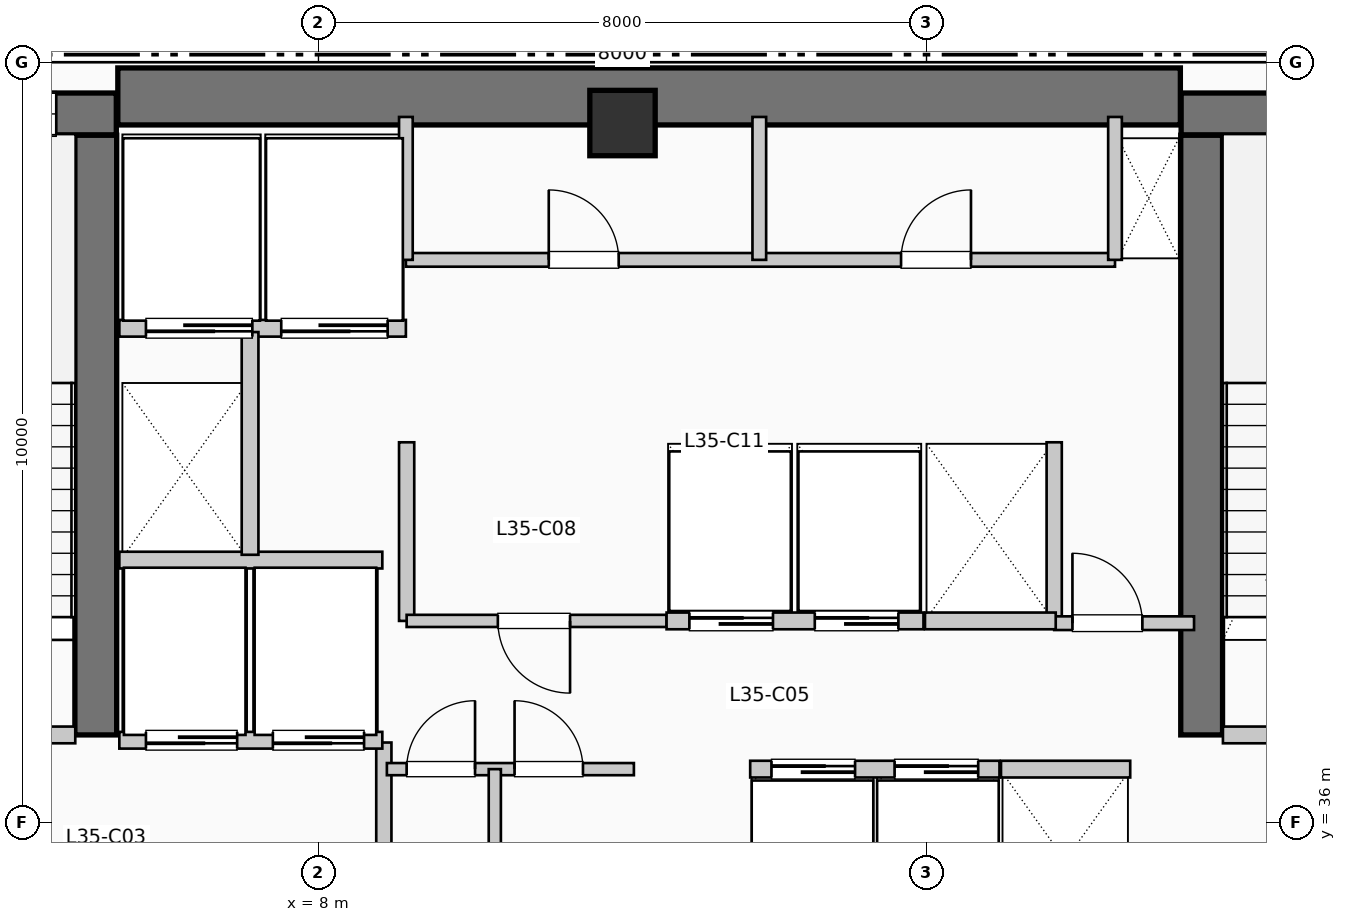
"""IFC4 building model, lengths in metres.
Left out: names, types, materials, properties, quantities, classifications, styles, units other than length and angle.
Written with IfcOpenShell. Run it as: python <this file> out.ifc"""

import sys

from ifc_helpers import new_model, si_unit, direction, frame, frame_2d, origin, origin_2d, place, context, subcontext, project, spatial, rectangle, extrude, element, fill, save


model = new_model("IFC4")
c1 = context("Model", 3, precision=1e-05, world=origin(), true_north=direction((0.0, 1.0)))
c2 = subcontext(c1, "Body", "Model", "MODEL_VIEW")
j1 = project(units=[si_unit("LENGTHUNIT", "METRE"), si_unit("PLANEANGLEUNIT", "RADIAN")], contexts=[c1])
p1 = place(None, origin())
s1 = spatial("IfcSite", under=j1, at=p1, CompositionType="ELEMENT")
p2 = place(p1, origin())
s2 = spatial("IfcBuilding", under=s1, at=p2, CompositionType="ELEMENT")
p3 = place(p2, frame((0.0, 0.0, 146.85)))
s3 = spatial("IfcBuildingStorey", under=s2, at=p3, CompositionType="ELEMENT", Elevation=146.85)
p4 = place(p3, frame((5.36, 45.55, 0.0), z_axis=(0.0, 0.0, 1.0), x_axis=(1.0, 0.0, 0.0)))
e1 = element("IfcWall", 1, at=p4, inside=s3, PredefinedType="SHEAR", context=c2, shape_type="SweptSolid", body=[
    extrude(rectangle(XDim=13.98, YDim=0.75, at=frame_2d((6.99, 0.0))), origin(), (0.0, 0.0, 1.0), 3.96),
])
p5 = place(p3, frame((5.07, 37.15, 0.0), z_axis=(0.0, 0.0, 1.0), x_axis=(0.0, 1.0, 0.0)))
e2 = element("IfcWall", 2, at=p5, inside=s3, PredefinedType="SHEAR", context=c2, shape_type="SweptSolid", body=[
    extrude(rectangle(XDim=7.89, YDim=0.55, at=frame_2d((3.945, 0.0))), origin(), (0.0, 0.0, 1.0), 3.96),
])
p6 = place(p3, frame((1.1, 45.32, 0.0), z_axis=(0.0, 0.0, 1.0), x_axis=(1.0, 0.0, 0.0)))
e3 = element("IfcWall", 3, at=p6, inside=s3, PredefinedType="SHEAR", context=c2, shape_type="SweptSolid", body=[
    extrude(rectangle(XDim=4.24, YDim=0.55, at=frame_2d((2.12, 0.0))), origin(), (0.0, 0.0, 1.0), 3.96),
])
p7 = place(p6, frame((2.05, 0.0, 1.05)))
e4 = element("IfcOpeningElement", 4, at=p7, cuts=e3, PredefinedType="OPENING", context=c2, shape_type="SweptSolid", body=[
    extrude(rectangle(XDim=1.4, YDim=1.8, at=frame_2d((0.7, 0.9))), frame((0.0, 0.285, 0.0), z_axis=(0.0, -1.0, 0.0), x_axis=(1.0, 0.0, 0.0)), (0.0, 0.0, 1.0), 0.57),
])
p8 = place(p3, frame((19.62, 37.15, 0.0), z_axis=(0.0, 0.0, 1.0), x_axis=(0.0, 1.0, 0.0)))
e5 = element("IfcWall", 5, at=p8, inside=s3, PredefinedType="SHEAR", context=c2, shape_type="SweptSolid", body=[
    extrude(rectangle(XDim=7.89, YDim=0.55, at=frame_2d((3.945, 0.0))), origin(), (0.0, 0.0, 1.0), 3.96),
])
p9 = place(p3, frame((19.35, 45.32, 0.0), z_axis=(0.0, 0.0, 1.0), x_axis=(1.0, 0.0, 0.0)))
e6 = element("IfcWall", 6, at=p9, inside=s3, PredefinedType="SHEAR", context=c2, shape_type="SweptSolid", body=[
    extrude(rectangle(XDim=3.69, YDim=0.55, at=frame_2d((1.845, 0.0))), origin(), (0.0, 0.0, 1.0), 3.96),
])
p10 = place(p9, frame((1.15, 0.0, 1.05)))
e7 = element("IfcOpeningElement", 7, at=p10, cuts=e6, PredefinedType="OPENING", context=c2, shape_type="SweptSolid", body=[
    extrude(rectangle(XDim=1.4, YDim=1.8, at=frame_2d((0.7, 0.9))), frame((0.0, 0.285, 0.0), z_axis=(0.0, -1.0, 0.0), x_axis=(1.0, 0.0, 0.0)), (0.0, 0.0, 1.0), 0.57),
])
p11 = place(p3, frame((12.0, 45.2, 0.0), z_axis=(0.0, 0.0, 1.0), x_axis=(1.0, 0.0, 0.0)))
e8 = element("IfcColumn", 8, at=p11, inside=s3, PredefinedType="COLUMN", context=c2, shape_type="SweptSolid", body=[
    extrude(rectangle(XDim=0.86, YDim=0.86, at=origin_2d()), origin(), (0.0, 0.0, 1.0), 3.96),
])
p12 = place(p3, frame((1.65, 37.15, 0.0), z_axis=(0.0, 0.0, 1.0), x_axis=(1.0, 0.0, 0.0)))
e9 = element("IfcWall", 9, at=p12, inside=s3, PredefinedType="PARTITIONING", context=c2, shape_type="SweptSolid", body=[
    extrude(rectangle(XDim=3.15, YDim=0.22, at=frame_2d((1.575, 0.0))), origin(), (0.0, 0.0, 1.0), 3.71),
])
p13 = place(p12, frame((2.05, 0.0, 0.0), z_axis=(0.0, 0.0, 1.0), x_axis=(-1.0, 0.0, 0.0)))
e10 = element("IfcOpeningElement", 10, at=p13, cuts=e9, PredefinedType="OPENING", context=c2, shape_type="SweptSolid", body=[
    extrude(rectangle(XDim=1.05, YDim=2.15, at=frame_2d((0.525, 1.075))), frame((0.0, 0.12, 0.0), z_axis=(0.0, -1.0, 0.0), x_axis=(1.0, 0.0, 0.0)), (0.0, 0.0, 1.0), 0.24),
])
p14 = place(p3, frame((8.86, 34.55, 0.0), z_axis=(0.0, 0.0, 1.0), x_axis=(0.0, 1.0, 0.0)))
e11 = element("IfcWall", 11, at=p14, inside=s3, PredefinedType="PARTITIONING", context=c2, shape_type="SweptSolid", body=[
    extrude(rectangle(XDim=2.5, YDim=0.2, at=frame_2d((1.25, 0.0))), origin(), (0.0, 0.0, 1.0), 3.71),
])
p15 = place(p3, frame((19.9, 37.15, 0.0), z_axis=(0.0, 0.0, 1.0), x_axis=(1.0, 0.0, 0.0)))
e12 = element("IfcWall", 12, at=p15, inside=s3, PredefinedType="PARTITIONING", context=c2, shape_type="SweptSolid", body=[
    extrude(rectangle(XDim=3.15, YDim=0.22, at=frame_2d((1.575, 0.0))), origin(), (0.0, 0.0, 1.0), 3.71),
])
p16 = place(p15, frame((2.05, 0.0, 0.0), z_axis=(0.0, 0.0, 1.0), x_axis=(-1.0, 0.0, 0.0)))
e13 = element("IfcOpeningElement", 13, at=p16, cuts=e12, PredefinedType="OPENING", context=c2, shape_type="SweptSolid", body=[
    extrude(rectangle(XDim=1.05, YDim=2.15, at=frame_2d((0.525, 1.075))), frame((0.0, 0.12, 0.0), z_axis=(0.0, -1.0, 0.0), x_axis=(1.0, 0.0, 0.0)), (0.0, 0.0, 1.0), 0.24),
])
p17 = place(p3, frame((5.38, 37.08, 0.0), z_axis=(0.0, 0.0, 1.0), x_axis=(1.0, 0.0, 0.0)))
e14 = element("IfcWall", 14, at=p17, inside=s3, PredefinedType="PARTITIONING", context=c2, shape_type="SweptSolid", body=[
    extrude(rectangle(XDim=3.46, YDim=0.22, at=frame_2d((1.73, 0.0))), origin(), (0.0, 0.0, 1.0), 3.71),
])
p18 = place(p17, frame((1.55, 0.0, 0.0), z_axis=(0.0, 0.0, 1.0), x_axis=(-1.0, 0.0, 0.0)))
e15 = element("IfcOpeningElement", 15, at=p18, cuts=e14, PredefinedType="OPENING", context=c2, shape_type="SweptSolid", body=[
    extrude(rectangle(XDim=1.2, YDim=2.2, at=frame_2d((0.6, 1.1))), frame((0.0, 0.12, 0.0), z_axis=(0.0, -1.0, 0.0), x_axis=(1.0, 0.0, 0.0)), (0.0, 0.0, 1.0), 0.24),
])
p19 = place(p17, frame((3.22, 0.0, 0.0), z_axis=(0.0, 0.0, 1.0), x_axis=(-1.0, 0.0, 0.0)))
e16 = element("IfcOpeningElement", 16, at=p19, cuts=e14, PredefinedType="OPENING", context=c2, shape_type="SweptSolid", body=[
    extrude(rectangle(XDim=1.2, YDim=2.2, at=frame_2d((0.6, 1.1))), frame((0.0, 0.12, 0.0), z_axis=(0.0, -1.0, 0.0), x_axis=(1.0, 0.0, 0.0)), (0.0, 0.0, 1.0), 0.24),
])
p20 = place(p3, frame((5.38, 39.45, 0.0), z_axis=(0.0, 0.0, 1.0), x_axis=(1.0, 0.0, 0.0)))
e17 = element("IfcWall", 17, at=p20, inside=s3, PredefinedType="PARTITIONING", context=c2, shape_type="SweptSolid", body=[
    extrude(rectangle(XDim=3.46, YDim=0.22, at=frame_2d((1.73, 0.0))), origin(), (0.0, 0.0, 1.0), 3.71),
])
p21 = place(p3, frame((5.38, 42.5, 0.0), z_axis=(0.0, 0.0, 1.0), x_axis=(1.0, 0.0, 0.0)))
e18 = element("IfcWall", 18, at=p21, inside=s3, PredefinedType="PARTITIONING", context=c2, shape_type="SweptSolid", body=[
    extrude(rectangle(XDim=3.77, YDim=0.22, at=frame_2d((1.885, 0.0))), origin(), (0.0, 0.0, 1.0), 3.71),
])
p22 = place(p21, frame((1.75, 0.0, 0.0), z_axis=(0.0, 0.0, 1.0), x_axis=(-1.0, 0.0, 0.0)))
e19 = element("IfcOpeningElement", 19, at=p22, cuts=e18, PredefinedType="OPENING", context=c2, shape_type="SweptSolid", body=[
    extrude(rectangle(XDim=1.4, YDim=2.2, at=frame_2d((0.7, 1.1))), frame((0.0, 0.12, 0.0), z_axis=(0.0, -1.0, 0.0), x_axis=(1.0, 0.0, 0.0)), (0.0, 0.0, 1.0), 0.24),
])
p23 = place(p21, frame((3.53, 0.0, 0.0), z_axis=(0.0, 0.0, 1.0), x_axis=(-1.0, 0.0, 0.0)))
e20 = element("IfcOpeningElement", 20, at=p23, cuts=e18, PredefinedType="OPENING", context=c2, shape_type="SweptSolid", body=[
    extrude(rectangle(XDim=1.4, YDim=2.2, at=frame_2d((0.7, 1.1))), frame((0.0, 0.12, 0.0), z_axis=(0.0, -1.0, 0.0), x_axis=(1.0, 0.0, 0.0)), (0.0, 0.0, 1.0), 0.24),
])
p24 = place(p3, frame((7.1, 39.52, 0.0), z_axis=(0.0, 0.0, 1.0), x_axis=(0.0, 1.0, 0.0)))
e21 = element("IfcWall", 21, at=p24, inside=s3, PredefinedType="PARTITIONING", context=c2, shape_type="SweptSolid", body=[
    extrude(rectangle(XDim=2.93, YDim=0.22, at=frame_2d((1.465, 0.0))), origin(), (0.0, 0.0, 1.0), 3.71),
])
for number, where, z_axis, x_axis in (
    (22, (9.16, 38.65, 0.0), (0.0, 0.0, 1.0), (0.0, 1.0, 0.0)),
    (23, (17.68, 38.65, 0.0), (0.0, 0.0, 1.0), (0.0, 1.0, 0.0)),
):
    element("IfcWall", number, at=place(p3, frame(where, z_axis=z_axis, x_axis=x_axis)), inside=s3, PredefinedType="PARTITIONING", context=c2, shape_type="SweptSolid", body=[
        extrude(rectangle(XDim=2.35, YDim=0.2, at=frame_2d((1.175, 0.0))), origin(), (0.0, 0.0, 1.0), 3.71),
    ])
p25 = place(p3, frame((17.68, 38.62, 0.0), z_axis=(0.0, 0.0, 1.0), x_axis=(1.0, 0.0, 0.0)))
e24 = element("IfcWall", 24, at=p25, inside=s3, PredefinedType="PARTITIONING", context=c2, shape_type="SweptSolid", body=[
    extrude(rectangle(XDim=1.84, YDim=0.18, at=frame_2d((0.92, 0.0))), origin(), (0.0, 0.0, 1.0), 3.71),
])
p26 = place(p25, frame((0.24, 0.0, 0.0)))
e25 = element("IfcOpeningElement", 25, at=p26, cuts=e24, PredefinedType="OPENING", context=c2, shape_type="SweptSolid", body=[
    extrude(rectangle(XDim=0.92, YDim=2.1, at=frame_2d((0.46, 1.05))), frame((0.0, 0.1, 0.0), z_axis=(0.0, -1.0, 0.0), x_axis=(1.0, 0.0, 0.0)), (0.0, 0.0, 1.0), 0.2),
])
p27 = place(p3, frame((8.9, 36.7, 0.0), z_axis=(0.0, 0.0, 1.0), x_axis=(1.0, 0.0, 0.0)))
e26 = element("IfcWall", 26, at=p27, inside=s3, PredefinedType="PARTITIONING", context=c2, shape_type="SweptSolid", body=[
    extrude(rectangle(XDim=3.25, YDim=0.16, at=frame_2d((1.625, 0.0))), origin(), (0.0, 0.0, 1.0), 3.71),
])
p28 = place(p27, frame((0.26, 0.0, 0.0)))
e27 = element("IfcOpeningElement", 27, at=p28, cuts=e26, PredefinedType="OPENING", context=c2, shape_type="SweptSolid", body=[
    extrude(rectangle(XDim=0.9, YDim=2.15, at=frame_2d((0.45, 1.075))), frame((0.0, 0.09, 0.0), z_axis=(0.0, -1.0, 0.0), x_axis=(1.0, 0.0, 0.0)), (0.0, 0.0, 1.0), 0.18),
])
p29 = place(p27, frame((1.68, 0.0, 0.0)))
e28 = element("IfcOpeningElement", 28, at=p29, cuts=e26, PredefinedType="OPENING", context=c2, shape_type="SweptSolid", body=[
    extrude(rectangle(XDim=0.9, YDim=2.15, at=frame_2d((0.45, 1.075))), frame((0.0, 0.09, 0.0), z_axis=(0.0, -1.0, 0.0), x_axis=(1.0, 0.0, 0.0)), (0.0, 0.0, 1.0), 0.18),
])
p30 = place(p3, frame((10.32, 34.55, 0.0), z_axis=(0.0, 0.0, 1.0), x_axis=(0.0, 1.0, 0.0)))
e29 = element("IfcWall", 29, at=p30, inside=s3, PredefinedType="PARTITIONING", context=c2, shape_type="SweptSolid", body=[
    extrude(rectangle(XDim=2.15, YDim=0.16, at=frame_2d((1.075, 0.0))), origin(), (0.0, 0.0, 1.0), 3.71),
])
p31 = place(p3, frame((9.16, 38.65, 0.0), z_axis=(0.0, 0.0, 1.0), x_axis=(1.0, 0.0, 0.0)))
e30 = element("IfcWall", 30, at=p31, inside=s3, PredefinedType="PARTITIONING", context=c2, shape_type="SweptSolid", body=[
    extrude(rectangle(XDim=3.42, YDim=0.16, at=frame_2d((1.71, 0.0))), origin(), (0.0, 0.0, 1.0), 3.71),
])
p32 = place(p31, frame((2.15, 0.0, 0.0), z_axis=(0.0, 0.0, 1.0), x_axis=(-1.0, 0.0, 0.0)))
e31 = element("IfcOpeningElement", 31, at=p32, cuts=e30, PredefinedType="OPENING", context=c2, shape_type="SweptSolid", body=[
    extrude(rectangle(XDim=0.95, YDim=2.15, at=frame_2d((0.475, 1.075))), frame((0.0, 0.09, 0.0), z_axis=(0.0, -1.0, 0.0), x_axis=(1.0, 0.0, 0.0)), (0.0, 0.0, 1.0), 0.18),
])
p33 = place(p3, frame((13.68, 36.7, 0.0), z_axis=(0.0, 0.0, 1.0), x_axis=(1.0, 0.0, 0.0)))
e32 = element("IfcWall", 32, at=p33, inside=s3, PredefinedType="PARTITIONING", context=c2, shape_type="SweptSolid", body=[
    extrude(rectangle(XDim=3.28, YDim=0.22, at=frame_2d((1.64, 0.0))), origin(), (0.0, 0.0, 1.0), 3.71),
])
p34 = place(p33, frame((0.28, 0.0, 0.0)))
e33 = element("IfcOpeningElement", 33, at=p34, cuts=e32, PredefinedType="OPENING", context=c2, shape_type="SweptSolid", body=[
    extrude(rectangle(XDim=1.1, YDim=2.2, at=frame_2d((0.55, 1.1))), frame((0.0, 0.12, 0.0), z_axis=(0.0, -1.0, 0.0), x_axis=(1.0, 0.0, 0.0)), (0.0, 0.0, 1.0), 0.24),
])
p35 = place(p33, frame((1.9, 0.0, 0.0)))
e34 = element("IfcOpeningElement", 34, at=p35, cuts=e32, PredefinedType="OPENING", context=c2, shape_type="SweptSolid", body=[
    extrude(rectangle(XDim=1.1, YDim=2.2, at=frame_2d((0.55, 1.1))), frame((0.0, 0.12, 0.0), z_axis=(0.0, -1.0, 0.0), x_axis=(1.0, 0.0, 0.0)), (0.0, 0.0, 1.0), 0.24),
])
p36 = place(p3, frame((12.58, 38.65, 0.0), z_axis=(0.0, 0.0, 1.0), x_axis=(1.0, 0.0, 0.0)))
e35 = element("IfcWall", 35, at=p36, inside=s3, PredefinedType="PARTITIONING", context=c2, shape_type="SweptSolid", body=[
    extrude(rectangle(XDim=3.38, YDim=0.22, at=frame_2d((1.69, 0.0))), origin(), (0.0, 0.0, 1.0), 3.71),
])
p37 = place(p36, frame((0.3, 0.0, 0.0)))
e36 = element("IfcOpeningElement", 36, at=p37, cuts=e35, PredefinedType="OPENING", context=c2, shape_type="SweptSolid", body=[
    extrude(rectangle(XDim=1.1, YDim=2.2, at=frame_2d((0.55, 1.1))), frame((0.0, 0.12, 0.0), z_axis=(0.0, -1.0, 0.0), x_axis=(1.0, 0.0, 0.0)), (0.0, 0.0, 1.0), 0.24),
])
p38 = place(p36, frame((1.95, 0.0, 0.0)))
e37 = element("IfcOpeningElement", 37, at=p38, cuts=e35, PredefinedType="OPENING", context=c2, shape_type="SweptSolid", body=[
    extrude(rectangle(XDim=1.1, YDim=2.2, at=frame_2d((0.55, 1.1))), frame((0.0, 0.12, 0.0), z_axis=(0.0, -1.0, 0.0), x_axis=(1.0, 0.0, 0.0)), (0.0, 0.0, 1.0), 0.24),
])
p39 = place(p3, frame((16.98, 36.7, 0.0), z_axis=(0.0, 0.0, 1.0), x_axis=(1.0, 0.0, 0.0)))
e38 = element("IfcWall", 38, at=p39, inside=s3, PredefinedType="PARTITIONING", context=c2, shape_type="SweptSolid", body=[
    extrude(rectangle(XDim=1.7, YDim=0.22, at=frame_2d((0.85, 0.0))), origin(), (0.0, 0.0, 1.0), 3.71),
])
p40 = place(p3, frame((15.98, 38.65, 0.0), z_axis=(0.0, 0.0, 1.0), x_axis=(1.0, 0.0, 0.0)))
e39 = element("IfcWall", 39, at=p40, inside=s3, PredefinedType="PARTITIONING", context=c2, shape_type="SweptSolid", body=[
    extrude(rectangle(XDim=1.72, YDim=0.22, at=frame_2d((0.86, 0.0))), origin(), (0.0, 0.0, 1.0), 3.71),
])
p41 = place(p3, frame((9.15, 43.4, 0.0), z_axis=(0.0, 0.0, 1.0), x_axis=(1.0, 0.0, 0.0)))
e40 = element("IfcWall", 40, at=p41, inside=s3, PredefinedType="PLUMBINGWALL", context=c2, shape_type="SweptSolid", body=[
    extrude(rectangle(XDim=9.33, YDim=0.18, at=frame_2d((4.665, 0.0))), origin(), (0.0, 0.0, 1.0), 3.71),
])
p42 = place(p41, frame((1.88, 0.0, 0.0)))
e41 = element("IfcOpeningElement", 41, at=p42, cuts=e40, PredefinedType="OPENING", context=c2, shape_type="SweptSolid", body=[
    extrude(rectangle(XDim=0.92, YDim=2.1, at=frame_2d((0.46, 1.05))), frame((0.0, 0.1, 0.0), z_axis=(0.0, -1.0, 0.0), x_axis=(1.0, 0.0, 0.0)), (0.0, 0.0, 1.0), 0.2),
])
p43 = place(p41, frame((6.515, 0.0, 0.0)))
e42 = element("IfcOpeningElement", 42, at=p43, cuts=e40, PredefinedType="OPENING", context=c2, shape_type="SweptSolid", body=[
    extrude(rectangle(XDim=0.92, YDim=2.1, at=frame_2d((0.46, 1.05))), frame((0.0, 0.1, 0.0), z_axis=(0.0, -1.0, 0.0), x_axis=(1.0, 0.0, 0.0)), (0.0, 0.0, 1.0), 0.2),
])
for number, where, z_axis, x_axis in (
    (43, (9.15, 43.4, 0.0), (0.0, 0.0, 1.0), (0.0, 1.0, 0.0)),
    (44, (18.48, 43.4, 0.0), (0.0, 0.0, 1.0), (0.0, 1.0, 0.0)),
    (45, (13.8, 43.4, 0.0), (0.0, 0.0, 1.0), (0.0, 1.0, 0.0)),
):
    element("IfcWall", number, at=place(p3, frame(where, z_axis=z_axis, x_axis=x_axis)), inside=s3, PredefinedType="PLUMBINGWALL", context=c2, shape_type="SweptSolid", body=[
        extrude(rectangle(XDim=1.88, YDim=0.18, at=frame_2d((0.94, 0.0))), origin(), (0.0, 0.0, 1.0), 3.71),
    ])
p44 = place(p7, origin())
e46 = element("IfcWindow", 46, at=p44, inside=s3, PartitioningType="SINGLE_PANEL", PredefinedType="WINDOW", context=c2, shape_type="SweptSolid", body=[
    extrude(rectangle(XDim=1.4, YDim=1.8, at=frame_2d((0.7, 0.9))), frame((0.0, 0.03, 0.0), z_axis=(0.0, -1.0, 0.0), x_axis=(1.0, 0.0, 0.0)), (0.0, 0.0, 1.0), 0.06),
])
fill(e4, e46)
p45 = place(p18, origin())
e47 = element("IfcDoor", 47, at=p45, inside=s3, OperationType="SLIDING_TO_RIGHT", PredefinedType="DOOR", context=c2, shape_type="SweptSolid", body=[
    extrude(rectangle(XDim=1.2, YDim=2.2, at=frame_2d((0.6, 1.1))), frame((0.0, 0.025, 0.0), z_axis=(0.0, -1.0, 0.0), x_axis=(1.0, 0.0, 0.0)), (0.0, 0.0, 1.0), 0.05),
])
fill(e15, e47)
p46 = place(p19, origin())
e48 = element("IfcDoor", 48, at=p46, inside=s3, OperationType="SLIDING_TO_RIGHT", PredefinedType="DOOR", context=c2, shape_type="SweptSolid", body=[
    extrude(rectangle(XDim=1.2, YDim=2.2, at=frame_2d((0.6, 1.1))), frame((0.0, 0.025, 0.0), z_axis=(0.0, -1.0, 0.0), x_axis=(1.0, 0.0, 0.0)), (0.0, 0.0, 1.0), 0.05),
])
fill(e16, e48)
p47 = place(p22, origin())
e49 = element("IfcDoor", 49, at=p47, inside=s3, OperationType="SLIDING_TO_LEFT", PredefinedType="DOOR", context=c2, shape_type="SweptSolid", body=[
    extrude(rectangle(XDim=1.4, YDim=2.2, at=frame_2d((0.7, 1.1))), frame((0.0, 0.025, 0.0), z_axis=(0.0, -1.0, 0.0), x_axis=(1.0, 0.0, 0.0)), (0.0, 0.0, 1.0), 0.05),
])
fill(e19, e49)
p48 = place(p23, origin())
e50 = element("IfcDoor", 50, at=p48, inside=s3, OperationType="SLIDING_TO_LEFT", PredefinedType="DOOR", context=c2, shape_type="SweptSolid", body=[
    extrude(rectangle(XDim=1.4, YDim=2.2, at=frame_2d((0.7, 1.1))), frame((0.0, 0.025, 0.0), z_axis=(0.0, -1.0, 0.0), x_axis=(1.0, 0.0, 0.0)), (0.0, 0.0, 1.0), 0.05),
])
fill(e20, e50)
p49 = place(p26, origin())
e51 = element("IfcDoor", 51, at=p49, inside=s3, OperationType="SINGLE_SWING_LEFT", PredefinedType="DOOR", context=c2, shape_type="SweptSolid", body=[
    extrude(rectangle(XDim=0.92, YDim=2.1, at=frame_2d((0.46, 1.05))), frame((0.0, 0.025, 0.0), z_axis=(0.0, -1.0, 0.0), x_axis=(1.0, 0.0, 0.0)), (0.0, 0.0, 1.0), 0.05),
])
fill(e25, e51)
p50 = place(p28, origin())
e52 = element("IfcDoor", 52, at=p50, inside=s3, OperationType="SINGLE_SWING_RIGHT", PredefinedType="DOOR", context=c2, shape_type="SweptSolid", body=[
    extrude(rectangle(XDim=0.9, YDim=2.15, at=frame_2d((0.45, 1.075))), frame((0.0, 0.025, 0.0), z_axis=(0.0, -1.0, 0.0), x_axis=(1.0, 0.0, 0.0)), (0.0, 0.0, 1.0), 0.05),
])
fill(e27, e52)
p51 = place(p29, origin())
e53 = element("IfcDoor", 53, at=p51, inside=s3, OperationType="SINGLE_SWING_LEFT", PredefinedType="DOOR", context=c2, shape_type="SweptSolid", body=[
    extrude(rectangle(XDim=0.9, YDim=2.15, at=frame_2d((0.45, 1.075))), frame((0.0, 0.025, 0.0), z_axis=(0.0, -1.0, 0.0), x_axis=(1.0, 0.0, 0.0)), (0.0, 0.0, 1.0), 0.05),
])
fill(e28, e53)
p52 = place(p32, origin())
e54 = element("IfcDoor", 54, at=p52, inside=s3, OperationType="SINGLE_SWING_RIGHT", PredefinedType="DOOR", context=c2, shape_type="SweptSolid", body=[
    extrude(rectangle(XDim=0.95, YDim=2.15, at=frame_2d((0.475, 1.075))), frame((0.0, 0.025, 0.0), z_axis=(0.0, -1.0, 0.0), x_axis=(1.0, 0.0, 0.0)), (0.0, 0.0, 1.0), 0.05),
])
fill(e31, e54)
p53 = place(p34, origin())
e55 = element("IfcDoor", 55, at=p53, inside=s3, OperationType="SLIDING_TO_RIGHT", PredefinedType="DOOR", context=c2, shape_type="SweptSolid", body=[
    extrude(rectangle(XDim=1.1, YDim=2.2, at=frame_2d((0.55, 1.1))), frame((0.0, 0.025, 0.0), z_axis=(0.0, -1.0, 0.0), x_axis=(1.0, 0.0, 0.0)), (0.0, 0.0, 1.0), 0.05),
])
fill(e33, e55)
p54 = place(p35, origin())
e56 = element("IfcDoor", 56, at=p54, inside=s3, OperationType="SLIDING_TO_RIGHT", PredefinedType="DOOR", context=c2, shape_type="SweptSolid", body=[
    extrude(rectangle(XDim=1.1, YDim=2.2, at=frame_2d((0.55, 1.1))), frame((0.0, 0.025, 0.0), z_axis=(0.0, -1.0, 0.0), x_axis=(1.0, 0.0, 0.0)), (0.0, 0.0, 1.0), 0.05),
])
fill(e34, e56)
p55 = place(p37, origin())
e57 = element("IfcDoor", 57, at=p55, inside=s3, OperationType="SLIDING_TO_RIGHT", PredefinedType="DOOR", context=c2, shape_type="SweptSolid", body=[
    extrude(rectangle(XDim=1.1, YDim=2.2, at=frame_2d((0.55, 1.1))), frame((0.0, 0.025, 0.0), z_axis=(0.0, -1.0, 0.0), x_axis=(1.0, 0.0, 0.0)), (0.0, 0.0, 1.0), 0.05),
])
fill(e36, e57)
p56 = place(p38, origin())
e58 = element("IfcDoor", 58, at=p56, inside=s3, OperationType="SLIDING_TO_RIGHT", PredefinedType="DOOR", context=c2, shape_type="SweptSolid", body=[
    extrude(rectangle(XDim=1.1, YDim=2.2, at=frame_2d((0.55, 1.1))), frame((0.0, 0.025, 0.0), z_axis=(0.0, -1.0, 0.0), x_axis=(1.0, 0.0, 0.0)), (0.0, 0.0, 1.0), 0.05),
])
fill(e37, e58)
p57 = place(p42, origin())
e59 = element("IfcDoor", 59, at=p57, inside=s3, OperationType="SINGLE_SWING_LEFT", PredefinedType="DOOR", context=c2, shape_type="SweptSolid", body=[
    extrude(rectangle(XDim=0.92, YDim=2.1, at=frame_2d((0.46, 1.05))), frame((0.0, 0.025, 0.0), z_axis=(0.0, -1.0, 0.0), x_axis=(1.0, 0.0, 0.0)), (0.0, 0.0, 1.0), 0.05),
])
fill(e41, e59)
p58 = place(p43, origin())
e60 = element("IfcDoor", 60, at=p58, inside=s3, OperationType="SINGLE_SWING_RIGHT", PredefinedType="DOOR", context=c2, shape_type="SweptSolid", body=[
    extrude(rectangle(XDim=0.92, YDim=2.1, at=frame_2d((0.46, 1.05))), frame((0.0, 0.025, 0.0), z_axis=(0.0, -1.0, 0.0), x_axis=(1.0, 0.0, 0.0)), (0.0, 0.0, 1.0), 0.05),
])
fill(e42, e60)
save(model, sys.argv[1])
